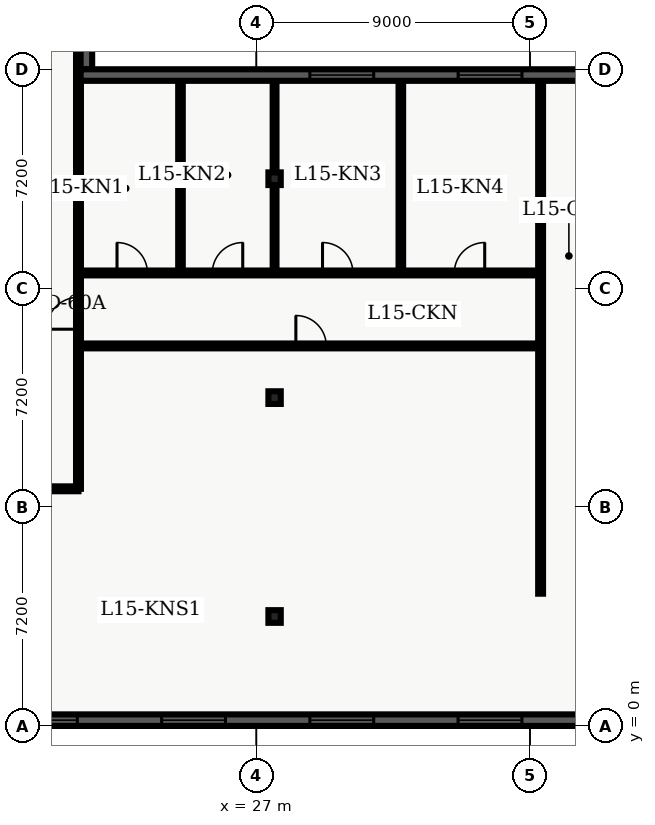
"""IFC4 building model, lengths in metres.
Left out: names, types, materials, properties, quantities, classifications, styles, units other than length and angle.
Written with IfcOpenShell. Run it as: python <this file> out.ifc"""

import sys

from ifc_helpers import new_model, entity, si_unit, converted_unit, direction, frame, origin_with_axes, origin_2d_with_axis, place, context, subcontext, project, spatial, polyline, rectangle, i_section, outline, extrude, element, fill, save


model = new_model("IFC4")
c1 = context("Model", 3, precision=1e-05, world=origin_with_axes(), true_north=direction((0.0, 1.0)))
c2 = subcontext(c1, "Body", "Model", "MODEL_VIEW")
j1 = project(units=[si_unit("LENGTHUNIT", "METRE"), converted_unit("PLANEANGLEUNIT", "DEGREE", entity("IfcPlaneAngleMeasure", 0.017), si_unit("PLANEANGLEUNIT", "RADIAN"), dimensions=[0, 0, 0, 0, 0, 0, 0])], contexts=[c1])
p1 = place(None, origin_with_axes())
s1 = spatial("IfcSite", under=j1, at=p1, CompositionType="ELEMENT")
p2 = place(p1, origin_with_axes())
s2 = spatial("IfcBuilding", under=s1, at=p2, CompositionType="ELEMENT")
p3 = place(p2, frame((0.0, 0.0, 63.9), z_axis=(0.0, 0.0, 1.0), x_axis=(1.0, 0.0, 0.0)))
s3 = spatial("IfcBuildingStorey", under=s2, at=p3, CompositionType="ELEMENT", Elevation=63.9)
for number, where, z_axis, x_axis in (
    (1, (27.6, 3.6, 0.0), (0.0, 0.0, 1.0), (1.0, 0.0, 0.0)),
    (2, (27.6, 10.8, 0.0), (0.0, 0.0, 1.0), (1.0, 0.0, 0.0)),
    (3, (27.6, 18.0, 0.0), (0.0, 0.0, 1.0), (1.0, 0.0, 0.0)),
):
    element("IfcColumn", number, at=place(p3, frame(where, z_axis=z_axis, x_axis=x_axis)), inside=s3, PredefinedType="COLUMN", context=c2, shape_type="SweptSolid", body=[
        extrude(i_section(OverallWidth=0.406, OverallDepth=0.416, WebThickness=0.03, FlangeThickness=0.048, FilletRadius=0.022, at=origin_2d_with_axis()), origin_with_axes(), (0.0, 0.0, 1.0), 3.9),
    ])
p4 = place(p3, frame((2.6, 7.8, 0.0), z_axis=(0.0, 0.0, 1.0), x_axis=(1.0, 0.0, 0.0)))
e4 = element("IfcWall", 4, at=p4, inside=s3, PredefinedType="PARTITIONING", context=c2, shape_type="SweptSolid", body=[
    extrude(outline(polyline([(0.0, -0.08), (18.55, -0.08), (18.55, 0.08), (0.0, 0.08), (0.0, -0.08)])), origin_with_axes(), (0.0, 0.0, 1.0), 2.7),
])
p5 = place(p4, frame((1.825, 0.0, 0.0), z_axis=(0.0, 0.0, 1.0), x_axis=(1.0, 0.0, 0.0)))
e5 = element("IfcOpeningElement", 5, at=p5, cuts=e4, PredefinedType="OPENING", context=c2, shape_type="SweptSolid", body=[
    extrude(rectangle(XDim=1.0, YDim=0.18, at=origin_2d_with_axis()), origin_with_axes(), (0.0, 0.0, 1.0), 2.15),
])
p6 = place(p4, frame((6.229, 0.0, 0.0), z_axis=(0.0, 0.0, 1.0), x_axis=(1.0, 0.0, 0.0)))
e6 = element("IfcOpeningElement", 6, at=p6, cuts=e4, PredefinedType="OPENING", context=c2, shape_type="SweptSolid", body=[
    extrude(rectangle(XDim=1.0, YDim=0.18, at=origin_2d_with_axis()), origin_with_axes(), (0.0, 0.0, 1.0), 2.15),
])
p7 = place(p4, frame((10.706, 0.0, 0.0), z_axis=(0.0, 0.0, 1.0), x_axis=(1.0, 0.0, 0.0)))
e7 = element("IfcOpeningElement", 7, at=p7, cuts=e4, PredefinedType="OPENING", context=c2, shape_type="SweptSolid", body=[
    extrude(rectangle(XDim=1.0, YDim=0.18, at=origin_2d_with_axis()), origin_with_axes(), (0.0, 0.0, 1.0), 2.15),
])
p8 = place(p4, frame((15.556, 0.0, 0.0), z_axis=(0.0, 0.0, 1.0), x_axis=(1.0, 0.0, 0.0)))
e8 = element("IfcOpeningElement", 8, at=p8, cuts=e4, PredefinedType="OPENING", context=c2, shape_type="SweptSolid", body=[
    extrude(rectangle(XDim=1.0, YDim=0.18, at=origin_2d_with_axis()), origin_with_axes(), (0.0, 0.0, 1.0), 2.15),
])
p9 = place(p3, frame((21.15, 7.8, 0.0), z_axis=(0.0, 0.0, 1.0), x_axis=(0.0, 1.0, 0.0)))
e9 = element("IfcWall", 9, at=p9, inside=s3, PredefinedType="PARTITIONING", context=c2, shape_type="SweptSolid", body=[
    extrude(outline(polyline([(0.0, -0.08), (32.7, -0.08), (32.7, 0.08), (0.0, 0.08), (0.0, -0.08)])), origin_with_axes(), (0.0, 0.0, 1.0), 2.7),
])
p10 = place(p9, frame((5.775, 0.0, 0.0), z_axis=(0.0, 0.0, 1.0), x_axis=(1.0, 0.0, 0.0)))
e10 = element("IfcOpeningElement", 10, at=p10, cuts=e9, PredefinedType="OPENING", context=c2, shape_type="SweptSolid", body=[
    extrude(rectangle(XDim=1.05, YDim=0.18, at=origin_2d_with_axis()), origin_with_axes(), (0.0, 0.0, 1.0), 2.15),
])
p11 = place(p3, frame((21.15, 12.5, 0.0), z_axis=(0.0, 0.0, 1.0), x_axis=(1.0, 0.0, 0.0)))
e11 = element("IfcWall", 11, at=p11, inside=s3, PredefinedType="PARTITIONING", context=c2, shape_type="SweptSolid", body=[
    extrude(outline(polyline([(0.0, -0.08), (15.2, -0.08), (15.2, 0.08), (0.0, 0.08), (0.0, -0.08)])), origin_with_axes(), (0.0, 0.0, 1.0), 2.7),
])
p12 = place(p11, frame((7.65, 0.0, 0.0), z_axis=(0.0, 0.0, 1.0), x_axis=(1.0, 0.0, 0.0)))
e12 = element("IfcOpeningElement", 12, at=p12, cuts=e11, PredefinedType="OPENING", context=c2, shape_type="SweptSolid", body=[
    extrude(rectangle(XDim=1.0, YDim=0.18, at=origin_2d_with_axis()), origin_with_axes(), (0.0, 0.0, 1.0), 2.15),
])
p13 = place(p3, frame((21.15, 14.9, 0.0), z_axis=(0.0, 0.0, 1.0), x_axis=(1.0, 0.0, 0.0)))
e13 = element("IfcWall", 13, at=p13, inside=s3, PredefinedType="PARTITIONING", context=c2, shape_type="SweptSolid", body=[
    extrude(outline(polyline([(0.0, -0.08), (15.2, -0.08), (15.2, 0.08), (0.0, 0.08), (0.0, -0.08)])), origin_with_axes(), (0.0, 0.0, 1.0), 2.7),
])
p14 = place(p13, frame((1.768, 0.0, 0.0), z_axis=(0.0, 0.0, 1.0), x_axis=(1.0, 0.0, 0.0)))
e14 = element("IfcOpeningElement", 14, at=p14, cuts=e13, PredefinedType="OPENING", context=c2, shape_type="SweptSolid", body=[
    extrude(rectangle(XDim=1.0, YDim=0.18, at=origin_2d_with_axis()), origin_with_axes(), (0.0, 0.0, 1.0), 2.15),
])
p15 = place(p13, frame((4.902, 0.0, 0.0), z_axis=(0.0, 0.0, 1.0), x_axis=(1.0, 0.0, 0.0)))
e15 = element("IfcOpeningElement", 15, at=p15, cuts=e13, PredefinedType="OPENING", context=c2, shape_type="SweptSolid", body=[
    extrude(rectangle(XDim=1.0, YDim=0.18, at=origin_2d_with_axis()), origin_with_axes(), (0.0, 0.0, 1.0), 2.15),
])
p16 = place(p13, frame((8.527, 0.0, 0.0), z_axis=(0.0, 0.0, 1.0), x_axis=(1.0, 0.0, 0.0)))
e16 = element("IfcOpeningElement", 16, at=p16, cuts=e13, PredefinedType="OPENING", context=c2, shape_type="SweptSolid", body=[
    extrude(rectangle(XDim=1.0, YDim=0.18, at=origin_2d_with_axis()), origin_with_axes(), (0.0, 0.0, 1.0), 2.15),
])
p17 = place(p13, frame((12.861, 0.0, 0.0), z_axis=(0.0, 0.0, 1.0), x_axis=(1.0, 0.0, 0.0)))
e17 = element("IfcOpeningElement", 17, at=p17, cuts=e13, PredefinedType="OPENING", context=c2, shape_type="SweptSolid", body=[
    extrude(rectangle(XDim=1.0, YDim=0.18, at=origin_2d_with_axis()), origin_with_axes(), (0.0, 0.0, 1.0), 2.15),
])
p18 = place(p3, frame((36.35, 4.35, 0.0), z_axis=(0.0, 0.0, 1.0), x_axis=(0.0, 1.0, 0.0)))
e18 = element("IfcWall", 18, at=p18, inside=s3, PredefinedType="PARTITIONING", context=c2, shape_type="SweptSolid", body=[
    extrude(outline(polyline([(0.0, -0.08), (16.95, -0.08), (16.95, 0.08), (0.0, 0.08), (0.0, -0.08)])), origin_with_axes(), (0.0, 0.0, 1.0), 2.7),
])
p19 = place(p3, frame((24.505, 15.02, 0.0), z_axis=(0.0, 0.0, 1.0), x_axis=(0.0, 1.0, 0.0)))
e19 = element("IfcWall", 19, at=p19, inside=s3, PredefinedType="PARTITIONING", context=c2, shape_type="SweptSolid", body=[
    extrude(outline(polyline([(0.0, -0.075), (6.205, -0.075), (6.205, 0.075), (0.0, 0.075), (0.0, -0.075)])), origin_with_axes(), (0.0, 0.0, 1.0), 2.7),
])
p20 = place(p3, frame((27.6, 15.02, 0.0), z_axis=(0.0, 0.0, 1.0), x_axis=(0.0, 1.0, 0.0)))
e20 = element("IfcWall", 20, at=p20, inside=s3, PredefinedType="PARTITIONING", context=c2, shape_type="SweptSolid", body=[
    extrude(outline(polyline([(0.0, -0.062), (6.205, -0.062), (6.205, 0.062), (0.0, 0.062), (0.0, -0.062)])), origin_with_axes(), (0.0, 0.0, 1.0), 2.7),
])
p21 = place(p3, frame((31.753, 15.02, 0.0), z_axis=(0.0, 0.0, 1.0), x_axis=(0.0, 1.0, 0.0)))
e21 = element("IfcWall", 21, at=p21, inside=s3, PredefinedType="PARTITIONING", context=c2, shape_type="SweptSolid", body=[
    extrude(outline(polyline([(0.0, -0.075), (6.205, -0.075), (6.205, 0.075), (0.0, 0.075), (0.0, -0.075)])), origin_with_axes(), (0.0, 0.0, 1.0), 2.7),
])
p22 = place(p3, frame((57.22, 0.19, 0.0), z_axis=(0.0, 0.0, 1.0), x_axis=(-1.0, 0.0, 0.0)))
e22 = element("IfcWall", 22, at=p22, inside=s3, PredefinedType="SOLIDWALL", context=c2, shape_type="SweptSolid", body=[
    extrude(outline(polyline([(0.0, -0.19), (54.82, -0.19), (54.82, 0.19), (0.0, 0.19), (0.0, -0.19)])), origin_with_axes(), (0.0, 0.0, 1.0), 3.66),
])
p23 = place(p22, frame((3.037, 0.0, 0.45), z_axis=(0.0, 0.0, 1.0), x_axis=(1.0, 0.0, 0.0)))
e23 = element("IfcOpeningElement", 23, at=p23, cuts=e22, PredefinedType="OPENING", context=c2, shape_type="SweptSolid", body=[
    extrude(rectangle(XDim=2.1, YDim=0.4, at=origin_2d_with_axis()), origin_with_axes(), (0.0, 0.0, 1.0), 2.2),
])
p24 = place(p22, frame((7.912, 0.0, 0.45), z_axis=(0.0, 0.0, 1.0), x_axis=(1.0, 0.0, 0.0)))
e24 = element("IfcOpeningElement", 24, at=p24, cuts=e22, PredefinedType="OPENING", context=c2, shape_type="SweptSolid", body=[
    extrude(rectangle(XDim=2.1, YDim=0.4, at=origin_2d_with_axis()), origin_with_axes(), (0.0, 0.0, 1.0), 2.2),
])
p25 = place(p22, frame((12.786, 0.0, 0.45), z_axis=(0.0, 0.0, 1.0), x_axis=(1.0, 0.0, 0.0)))
e25 = element("IfcOpeningElement", 25, at=p25, cuts=e22, PredefinedType="OPENING", context=c2, shape_type="SweptSolid", body=[
    extrude(rectangle(XDim=2.1, YDim=0.4, at=origin_2d_with_axis()), origin_with_axes(), (0.0, 0.0, 1.0), 2.2),
])
p26 = place(p22, frame((17.661, 0.0, 0.45), z_axis=(0.0, 0.0, 1.0), x_axis=(1.0, 0.0, 0.0)))
e26 = element("IfcOpeningElement", 26, at=p26, cuts=e22, PredefinedType="OPENING", context=c2, shape_type="SweptSolid", body=[
    extrude(rectangle(XDim=2.1, YDim=0.4, at=origin_2d_with_axis()), origin_with_axes(), (0.0, 0.0, 1.0), 2.2),
])
p27 = place(p22, frame((22.535, 0.0, 0.45), z_axis=(0.0, 0.0, 1.0), x_axis=(1.0, 0.0, 0.0)))
e27 = element("IfcOpeningElement", 27, at=p27, cuts=e22, PredefinedType="OPENING", context=c2, shape_type="SweptSolid", body=[
    extrude(rectangle(XDim=2.1, YDim=0.4, at=origin_2d_with_axis()), origin_with_axes(), (0.0, 0.0, 1.0), 2.2),
])
p28 = place(p22, frame((27.41, 0.0, 0.45), z_axis=(0.0, 0.0, 1.0), x_axis=(1.0, 0.0, 0.0)))
e28 = element("IfcOpeningElement", 28, at=p28, cuts=e22, PredefinedType="OPENING", context=c2, shape_type="SweptSolid", body=[
    extrude(rectangle(XDim=2.1, YDim=0.4, at=origin_2d_with_axis()), origin_with_axes(), (0.0, 0.0, 1.0), 2.2),
])
p29 = place(p22, frame((32.285, 0.0, 0.45), z_axis=(0.0, 0.0, 1.0), x_axis=(1.0, 0.0, 0.0)))
e29 = element("IfcOpeningElement", 29, at=p29, cuts=e22, PredefinedType="OPENING", context=c2, shape_type="SweptSolid", body=[
    extrude(rectangle(XDim=2.1, YDim=0.4, at=origin_2d_with_axis()), origin_with_axes(), (0.0, 0.0, 1.0), 2.2),
])
p30 = place(p22, frame((37.159, 0.0, 0.45), z_axis=(0.0, 0.0, 1.0), x_axis=(1.0, 0.0, 0.0)))
e30 = element("IfcOpeningElement", 30, at=p30, cuts=e22, PredefinedType="OPENING", context=c2, shape_type="SweptSolid", body=[
    extrude(rectangle(XDim=2.1, YDim=0.4, at=origin_2d_with_axis()), origin_with_axes(), (0.0, 0.0, 1.0), 2.2),
])
p31 = place(p22, frame((47.758, 0.0, 0.45), z_axis=(0.0, 0.0, 1.0), x_axis=(1.0, 0.0, 0.0)))
e31 = element("IfcOpeningElement", 31, at=p31, cuts=e22, PredefinedType="OPENING", context=c2, shape_type="SweptSolid", body=[
    extrude(rectangle(XDim=2.1, YDim=0.4, at=origin_2d_with_axis()), origin_with_axes(), (0.0, 0.0, 1.0), 2.2),
])
p32 = place(p22, frame((52.633, 0.0, 0.45), z_axis=(0.0, 0.0, 1.0), x_axis=(1.0, 0.0, 0.0)))
e32 = element("IfcOpeningElement", 32, at=p32, cuts=e22, PredefinedType="OPENING", context=c2, shape_type="SweptSolid", body=[
    extrude(rectangle(XDim=2.1, YDim=0.4, at=origin_2d_with_axis()), origin_with_axes(), (0.0, 0.0, 1.0), 2.2),
])
p33 = place(p3, frame((21.41, 45.82, 0.0), z_axis=(0.0, 0.0, 1.0), x_axis=(0.0, -1.0, 0.0)))
e33 = element("IfcWall", 33, at=p33, inside=s3, PredefinedType="SOLIDWALL", context=c2, shape_type="SweptSolid", body=[
    extrude(outline(polyline([(0.0, -0.19), (24.22, -0.19), (24.22, 0.19), (0.0, 0.19), (0.0, -0.19)])), origin_with_axes(), (0.0, 0.0, 1.0), 3.66),
])
p34 = place(p33, frame((2.902, 0.0, 0.45), z_axis=(0.0, 0.0, 1.0), x_axis=(1.0, 0.0, 0.0)))
e34 = element("IfcOpeningElement", 34, at=p34, cuts=e33, PredefinedType="OPENING", context=c2, shape_type="SweptSolid", body=[
    extrude(rectangle(XDim=2.1, YDim=0.4, at=origin_2d_with_axis()), origin_with_axes(), (0.0, 0.0, 1.0), 2.2),
])
p35 = place(p3, frame((21.22, 21.41, 0.0), z_axis=(0.0, 0.0, 1.0), x_axis=(1.0, 0.0, 0.0)))
e35 = element("IfcWall", 35, at=p35, inside=s3, PredefinedType="SOLIDWALL", context=c2, shape_type="SweptSolid", body=[
    extrude(outline(polyline([(0.0, -0.19), (17.18, -0.19), (17.18, 0.19), (0.0, 0.19), (0.0, -0.19)])), origin_with_axes(), (0.0, 0.0, 1.0), 3.66),
])
p36 = place(p35, frame((8.59, 0.0, 0.45), z_axis=(0.0, 0.0, 1.0), x_axis=(1.0, 0.0, 0.0)))
e36 = element("IfcOpeningElement", 36, at=p36, cuts=e35, PredefinedType="OPENING", context=c2, shape_type="SweptSolid", body=[
    extrude(rectangle(XDim=2.1, YDim=0.4, at=origin_2d_with_axis()), origin_with_axes(), (0.0, 0.0, 1.0), 2.2),
])
p37 = place(p35, frame((13.467, 0.0, 0.45), z_axis=(0.0, 0.0, 1.0), x_axis=(1.0, 0.0, 0.0)))
e37 = element("IfcOpeningElement", 37, at=p37, cuts=e35, PredefinedType="OPENING", context=c2, shape_type="SweptSolid", body=[
    extrude(rectangle(XDim=2.1, YDim=0.4, at=origin_2d_with_axis()), origin_with_axes(), (0.0, 0.0, 1.0), 2.2),
])
p38 = place(p9, frame((5.775, 0.0, 0.0), z_axis=(0.0, 0.0, 1.0), x_axis=(1.0, 0.0, 0.0)))
e38 = element("IfcDoor", 38, at=p38, inside=s3, OperationType="SINGLE_SWING_LEFT", PredefinedType="DOOR", context=c2, shape_type="SweptSolid", body=[
    extrude(rectangle(XDim=1.05, YDim=0.09, at=origin_2d_with_axis()), origin_with_axes(), (0.0, 0.0, 1.0), 2.15),
])
fill(e10, e38)
p39 = place(p11, frame((7.65, 0.0, 0.0), z_axis=(0.0, 0.0, 1.0), x_axis=(1.0, 0.0, 0.0)))
e39 = element("IfcDoor", 39, at=p39, inside=s3, OperationType="SINGLE_SWING_LEFT", PredefinedType="DOOR", context=c2, shape_type="SweptSolid", body=[
    extrude(rectangle(XDim=1.0, YDim=0.09, at=origin_2d_with_axis()), origin_with_axes(), (0.0, 0.0, 1.0), 2.15),
])
fill(e12, e39)
p40 = place(p13, frame((1.768, 0.0, 0.0), z_axis=(0.0, 0.0, 1.0), x_axis=(1.0, 0.0, 0.0)))
e40 = element("IfcDoor", 40, at=p40, inside=s3, OperationType="SINGLE_SWING_LEFT", PredefinedType="DOOR", context=c2, shape_type="SweptSolid", body=[
    extrude(rectangle(XDim=1.0, YDim=0.09, at=origin_2d_with_axis()), origin_with_axes(), (0.0, 0.0, 1.0), 2.15),
])
fill(e14, e40)
p41 = place(p13, frame((4.902, 0.0, 0.0), z_axis=(0.0, 0.0, 1.0), x_axis=(1.0, 0.0, 0.0)))
e41 = element("IfcDoor", 41, at=p41, inside=s3, OperationType="SINGLE_SWING_RIGHT", PredefinedType="DOOR", context=c2, shape_type="SweptSolid", body=[
    extrude(rectangle(XDim=1.0, YDim=0.09, at=origin_2d_with_axis()), origin_with_axes(), (0.0, 0.0, 1.0), 2.15),
])
fill(e15, e41)
p42 = place(p13, frame((8.527, 0.0, 0.0), z_axis=(0.0, 0.0, 1.0), x_axis=(1.0, 0.0, 0.0)))
e42 = element("IfcDoor", 42, at=p42, inside=s3, OperationType="SINGLE_SWING_LEFT", PredefinedType="DOOR", context=c2, shape_type="SweptSolid", body=[
    extrude(rectangle(XDim=1.0, YDim=0.09, at=origin_2d_with_axis()), origin_with_axes(), (0.0, 0.0, 1.0), 2.15),
])
fill(e16, e42)
p43 = place(p13, frame((12.861, 0.0, 0.0), z_axis=(0.0, 0.0, 1.0), x_axis=(1.0, 0.0, 0.0)))
e43 = element("IfcDoor", 43, at=p43, inside=s3, OperationType="SINGLE_SWING_RIGHT", PredefinedType="DOOR", context=c2, shape_type="SweptSolid", body=[
    extrude(rectangle(XDim=1.0, YDim=0.09, at=origin_2d_with_axis()), origin_with_axes(), (0.0, 0.0, 1.0), 2.15),
])
fill(e17, e43)
p44 = place(p22, frame((22.535, 0.0, 0.45), z_axis=(0.0, 0.0, 1.0), x_axis=(1.0, 0.0, 0.0)))
e44 = element("IfcWindow", 44, at=p44, inside=s3, PredefinedType="WINDOW", context=c2, shape_type="SweptSolid", body=[
    extrude(rectangle(XDim=2.1, YDim=0.09, at=origin_2d_with_axis()), origin_with_axes(), (0.0, 0.0, 1.0), 2.2),
])
fill(e27, e44)
p45 = place(p22, frame((27.41, 0.0, 0.45), z_axis=(0.0, 0.0, 1.0), x_axis=(1.0, 0.0, 0.0)))
e45 = element("IfcWindow", 45, at=p45, inside=s3, PredefinedType="WINDOW", context=c2, shape_type="SweptSolid", body=[
    extrude(rectangle(XDim=2.1, YDim=0.09, at=origin_2d_with_axis()), origin_with_axes(), (0.0, 0.0, 1.0), 2.2),
])
fill(e28, e45)
p46 = place(p22, frame((32.285, 0.0, 0.45), z_axis=(0.0, 0.0, 1.0), x_axis=(1.0, 0.0, 0.0)))
e46 = element("IfcWindow", 46, at=p46, inside=s3, PredefinedType="WINDOW", context=c2, shape_type="SweptSolid", body=[
    extrude(rectangle(XDim=2.1, YDim=0.09, at=origin_2d_with_axis()), origin_with_axes(), (0.0, 0.0, 1.0), 2.2),
])
fill(e29, e46)
p47 = place(p22, frame((37.159, 0.0, 0.45), z_axis=(0.0, 0.0, 1.0), x_axis=(1.0, 0.0, 0.0)))
e47 = element("IfcWindow", 47, at=p47, inside=s3, PredefinedType="WINDOW", context=c2, shape_type="SweptSolid", body=[
    extrude(rectangle(XDim=2.1, YDim=0.09, at=origin_2d_with_axis()), origin_with_axes(), (0.0, 0.0, 1.0), 2.2),
])
fill(e30, e47)
p48 = place(p35, frame((8.59, 0.0, 0.45), z_axis=(0.0, 0.0, 1.0), x_axis=(1.0, 0.0, 0.0)))
e48 = element("IfcWindow", 48, at=p48, inside=s3, PredefinedType="WINDOW", context=c2, shape_type="SweptSolid", body=[
    extrude(rectangle(XDim=2.1, YDim=0.09, at=origin_2d_with_axis()), origin_with_axes(), (0.0, 0.0, 1.0), 2.2),
])
fill(e36, e48)
p49 = place(p35, frame((13.467, 0.0, 0.45), z_axis=(0.0, 0.0, 1.0), x_axis=(1.0, 0.0, 0.0)))
e49 = element("IfcWindow", 49, at=p49, inside=s3, PredefinedType="WINDOW", context=c2, shape_type="SweptSolid", body=[
    extrude(rectangle(XDim=2.1, YDim=0.09, at=origin_2d_with_axis()), origin_with_axes(), (0.0, 0.0, 1.0), 2.2),
])
fill(e37, e49)
save(model, sys.argv[1])
